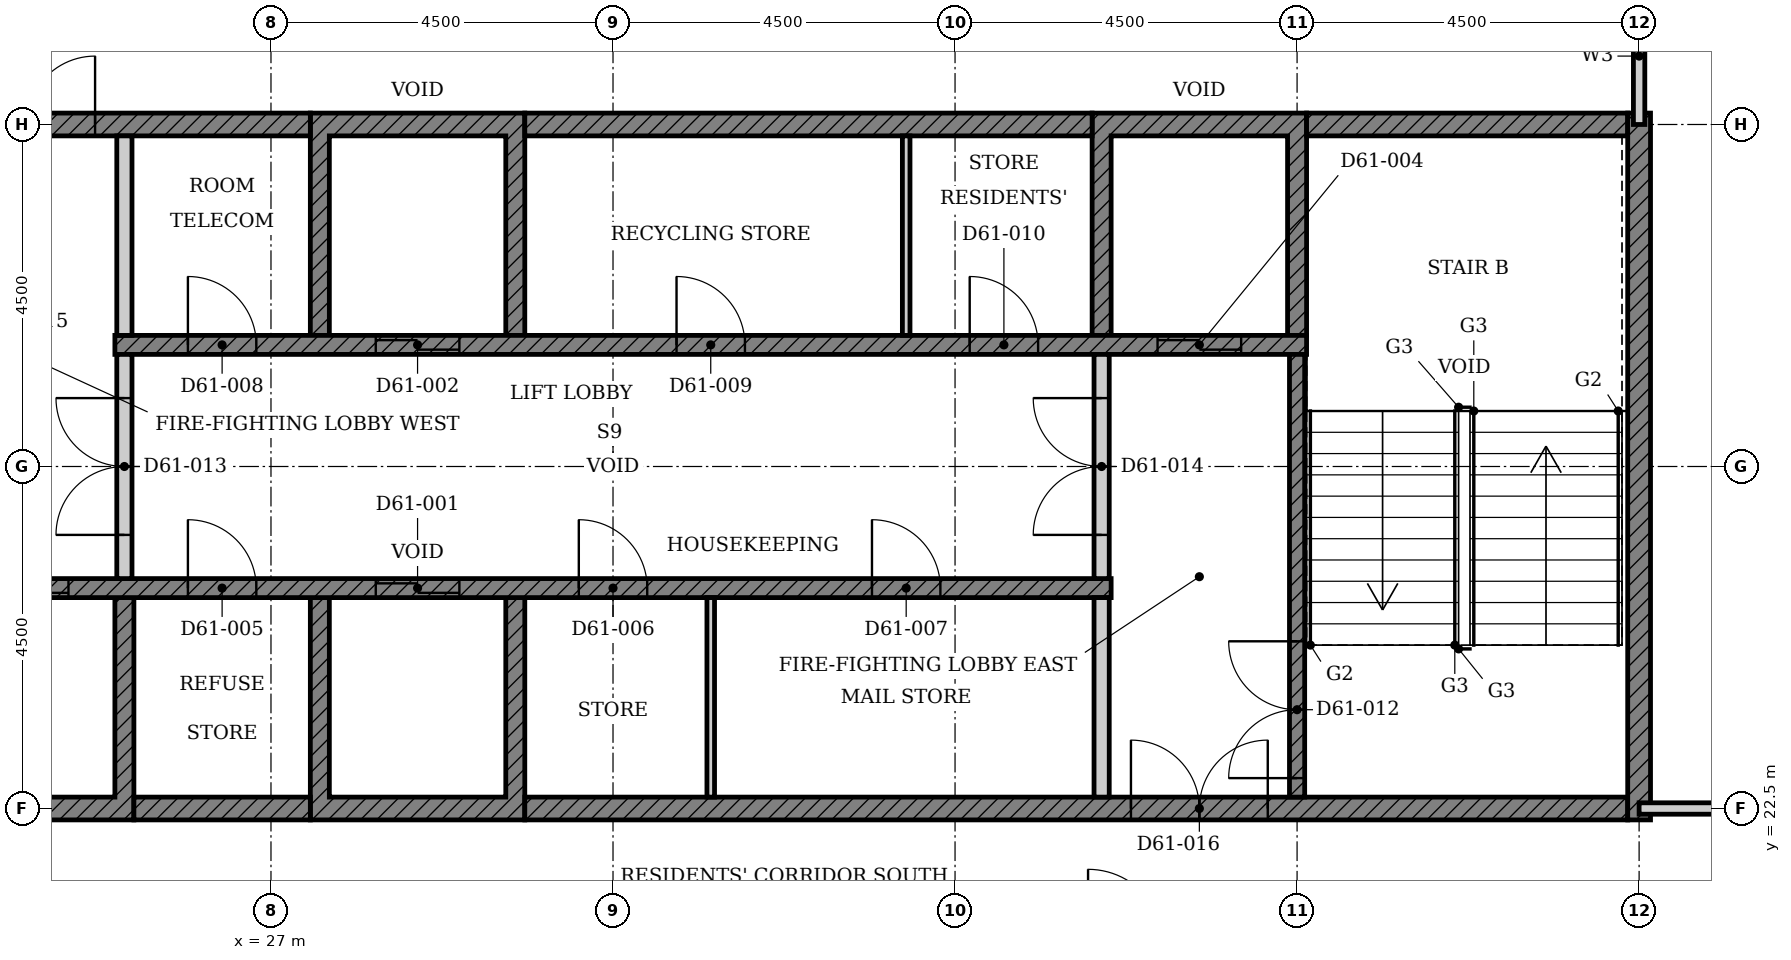
"""IFC4 building model, lengths in metres.
Left out: names, types, materials, properties, quantities, classifications, styles, units other than length and angle.
Written with IfcOpenShell. Run it as: python <this file> out.ifc"""

import sys

from ifc_helpers import new_model, si_unit, direction, frame, frame_2d, origin, place, context, subcontext, project, spatial, polyline, rectangle, outline, extrude, element, fill, save


model = new_model("IFC4")
c1 = context("Model", 3, precision=1e-05, world=origin(), true_north=direction((0.0, 1.0)))
c2 = subcontext(c1, "Body", "Model", "MODEL_VIEW")
j1 = project(units=[si_unit("LENGTHUNIT", "METRE"), si_unit("PLANEANGLEUNIT", "RADIAN")], contexts=[c1])
p1 = place(None, origin())
s1 = spatial("IfcSite", under=j1, at=p1, CompositionType="ELEMENT")
p2 = place(p1, origin())
s2 = spatial("IfcBuilding", under=s1, at=p2, CompositionType="ELEMENT")
p3 = place(p2, frame((0.0, 0.0, 241.6)))
s3 = spatial("IfcBuildingStorey", under=s2, at=p3, CompositionType="ELEMENT", Elevation=241.6)
p4 = place(p3, origin())
e1 = element("IfcWall", 1, at=p4, inside=s3, PredefinedType="SHEAR", context=c2, shape_type="SweptSolid", body=[
    extrude(outline(polyline([(22.375, 22.35), (25.197, 22.35), (25.197, 25.275), (24.947, 25.275), (24.947, 22.65), (22.625, 22.65), (22.625, 25.275), (22.375, 25.275), (22.375, 22.35)])), origin(), (0.0, 0.0, 1.0), 3.4),
])
p5 = place(p3, origin())
e2 = element("IfcWall", 2, at=p5, inside=s3, PredefinedType="SHEAR", context=c2, shape_type="SweptSolid", body=[
    extrude(outline(polyline([(27.518, 22.35), (30.339, 22.35), (30.339, 25.275), (30.089, 25.275), (30.089, 22.65), (27.768, 22.65), (27.768, 25.275), (27.518, 25.275), (27.518, 22.35)])), origin(), (0.0, 0.0, 1.0), 3.4),
])
p6 = place(p3, origin())
e3 = element("IfcWall", 3, at=p6, inside=s3, PredefinedType="SHEAR", context=c2, shape_type="SweptSolid", body=[
    extrude(outline(polyline([(27.518, 28.725), (27.768, 28.725), (27.768, 31.35), (30.089, 31.35), (30.089, 28.725), (30.339, 28.725), (30.339, 31.65), (27.518, 31.65), (27.518, 28.725)])), origin(), (0.0, 0.0, 1.0), 3.4),
])
p7 = place(p3, origin())
e4 = element("IfcWall", 4, at=p7, inside=s3, PredefinedType="SHEAR", context=c2, shape_type="SweptSolid", body=[
    extrude(outline(polyline([(37.803, 28.725), (38.053, 28.725), (38.053, 31.35), (40.375, 31.35), (40.375, 28.725), (40.625, 28.725), (40.625, 31.65), (37.803, 31.65), (37.803, 28.725)])), origin(), (0.0, 0.0, 1.0), 3.4),
])
p8 = place(p3, frame((25.197, 22.5, 0.0), z_axis=(0.0, 0.0, 1.0), x_axis=(1.0, 0.0, 0.0)))
e5 = element("IfcWall", 5, at=p8, inside=s3, PredefinedType="SHEAR", context=c2, shape_type="SweptSolid", body=[
    extrude(rectangle(XDim=2.321, YDim=0.3, at=frame_2d((1.161, 0.0))), origin(), (0.0, 0.0, 1.0), 3.4),
])
p9 = place(p3, frame((30.339, 22.5, 0.0), z_axis=(0.0, 0.0, 1.0), x_axis=(1.0, 0.0, 0.0)))
e6 = element("IfcWall", 6, at=p9, inside=s3, PredefinedType="SHEAR", context=c2, shape_type="SweptSolid", body=[
    extrude(rectangle(XDim=14.511, YDim=0.3, at=frame_2d((7.255, 0.0))), origin(), (0.0, 0.0, 1.0), 3.4),
])
p10 = place(p9, frame((7.975, 0.0, 0.0)))
e7 = element("IfcOpeningElement", 7, at=p10, cuts=e6, PredefinedType="OPENING", context=c2, shape_type="SweptSolid", body=[
    extrude(rectangle(XDim=1.8, YDim=2.1, at=frame_2d((0.9, 1.05))), frame((0.0, 0.16, 0.0), z_axis=(0.0, -1.0, 0.0), x_axis=(1.0, 0.0, 0.0)), (0.0, 0.0, 1.0), 0.32),
])
p11 = place(p3, frame((18.15, 31.5, 0.0), z_axis=(0.0, 0.0, 1.0), x_axis=(1.0, 0.0, 0.0)))
e8 = element("IfcWall", 8, at=p11, inside=s3, PredefinedType="SHEAR", context=c2, shape_type="SweptSolid", body=[
    extrude(rectangle(XDim=9.368, YDim=0.3, at=frame_2d((4.684, 0.0))), origin(), (0.0, 0.0, 1.0), 3.4),
])
p12 = place(p11, frame((4.736, 0.0, 0.0)))
e9 = element("IfcOpeningElement", 9, at=p12, cuts=e8, PredefinedType="OPENING", context=c2, shape_type="SweptSolid", body=[
    extrude(rectangle(XDim=1.8, YDim=2.1, at=frame_2d((0.9, 1.05))), frame((0.0, 0.16, 0.0), z_axis=(0.0, -1.0, 0.0), x_axis=(1.0, 0.0, 0.0)), (0.0, 0.0, 1.0), 0.32),
])
p13 = place(p3, frame((30.339, 31.5, 0.0), z_axis=(0.0, 0.0, 1.0), x_axis=(1.0, 0.0, 0.0)))
e10 = element("IfcWall", 10, at=p13, inside=s3, PredefinedType="SHEAR", context=c2, shape_type="SweptSolid", body=[
    extrude(rectangle(XDim=7.464, YDim=0.3, at=frame_2d((3.732, 0.0))), origin(), (0.0, 0.0, 1.0), 3.4),
])
p14 = place(p3, frame((40.625, 31.5, 0.0), z_axis=(0.0, 0.0, 1.0), x_axis=(1.0, 0.0, 0.0)))
e11 = element("IfcWall", 11, at=p14, inside=s3, PredefinedType="SHEAR", context=c2, shape_type="SweptSolid", body=[
    extrude(rectangle(XDim=4.225, YDim=0.3, at=frame_2d((2.113, 0.0))), origin(), (0.0, 0.0, 1.0), 3.4),
])
p15 = place(p3, frame((45.0, 22.35, 0.0), z_axis=(0.0, 0.0, 1.0), x_axis=(0.0, 1.0, 0.0)))
e12 = element("IfcWall", 12, at=p15, inside=s3, PredefinedType="SHEAR", context=c2, shape_type="SweptSolid", body=[
    extrude(rectangle(XDim=9.3, YDim=0.3, at=frame_2d((4.65, 0.0))), origin(), (0.0, 0.0, 1.0), 3.4),
])
p16 = place(p3, frame((22.375, 25.4, 0.0), z_axis=(0.0, 0.0, 1.0), x_axis=(1.0, 0.0, 0.0)))
e13 = element("IfcWall", 13, at=p16, inside=s3, PredefinedType="SHEAR", context=c2, shape_type="SweptSolid", body=[
    extrude(rectangle(XDim=15.678, YDim=0.25, at=frame_2d((7.839, 0.0))), origin(), (0.0, 0.0, 1.0), 3.4),
])
p17 = place(p16, frame((6.004, 0.0, 0.0)))
e14 = element("IfcOpeningElement", 14, at=p17, cuts=e13, PredefinedType="OPENING", context=c2, shape_type="SweptSolid", body=[
    extrude(rectangle(XDim=1.1, YDim=2.1, at=frame_2d((0.55, 1.05))), frame((0.0, 0.135, 0.0), z_axis=(0.0, -1.0, 0.0), x_axis=(1.0, 0.0, 0.0)), (0.0, 0.0, 1.0), 0.27),
])
p18 = place(p16, frame((0.861, 0.0, 0.0)))
e15 = element("IfcOpeningElement", 15, at=p18, cuts=e13, PredefinedType="OPENING", context=c2, shape_type="SweptSolid", body=[
    extrude(rectangle(XDim=1.1, YDim=2.1, at=frame_2d((0.55, 1.05))), frame((0.0, 0.135, 0.0), z_axis=(0.0, -1.0, 0.0), x_axis=(1.0, 0.0, 0.0)), (0.0, 0.0, 1.0), 0.27),
])
p19 = place(p16, frame((3.532, 0.0, 0.0)))
e16 = element("IfcOpeningElement", 16, at=p19, cuts=e13, PredefinedType="OPENING", context=c2, shape_type="SweptSolid", body=[
    extrude(rectangle(XDim=0.9, YDim=2.1, at=frame_2d((0.45, 1.05))), frame((0.0, 0.135, 0.0), z_axis=(0.0, -1.0, 0.0), x_axis=(1.0, 0.0, 0.0)), (0.0, 0.0, 1.0), 0.27),
])
p20 = place(p16, frame((8.675, 0.0, 0.0)))
e17 = element("IfcOpeningElement", 17, at=p20, cuts=e13, PredefinedType="OPENING", context=c2, shape_type="SweptSolid", body=[
    extrude(rectangle(XDim=0.9, YDim=2.1, at=frame_2d((0.45, 1.05))), frame((0.0, 0.135, 0.0), z_axis=(0.0, -1.0, 0.0), x_axis=(1.0, 0.0, 0.0)), (0.0, 0.0, 1.0), 0.27),
])
p21 = place(p16, frame((12.532, 0.0, 0.0)))
e18 = element("IfcOpeningElement", 18, at=p21, cuts=e13, PredefinedType="OPENING", context=c2, shape_type="SweptSolid", body=[
    extrude(rectangle(XDim=0.9, YDim=2.1, at=frame_2d((0.45, 1.05))), frame((0.0, 0.135, 0.0), z_axis=(0.0, -1.0, 0.0), x_axis=(1.0, 0.0, 0.0)), (0.0, 0.0, 1.0), 0.27),
])
p22 = place(p3, frame((24.947, 28.6, 0.0), z_axis=(0.0, 0.0, 1.0), x_axis=(1.0, 0.0, 0.0)))
e19 = element("IfcWall", 19, at=p22, inside=s3, PredefinedType="SHEAR", context=c2, shape_type="SweptSolid", body=[
    extrude(rectangle(XDim=15.678, YDim=0.25, at=frame_2d((7.839, 0.0))), origin(), (0.0, 0.0, 1.0), 3.4),
])
p23 = place(p22, frame((3.432, 0.0, 0.0)))
e20 = element("IfcOpeningElement", 20, at=p23, cuts=e19, PredefinedType="OPENING", context=c2, shape_type="SweptSolid", body=[
    extrude(rectangle(XDim=1.1, YDim=2.1, at=frame_2d((0.55, 1.05))), frame((0.0, 0.135, 0.0), z_axis=(0.0, -1.0, 0.0), x_axis=(1.0, 0.0, 0.0)), (0.0, 0.0, 1.0), 0.27),
])
p24 = place(p22, frame((13.718, 0.0, 0.0)))
e21 = element("IfcOpeningElement", 21, at=p24, cuts=e19, PredefinedType="OPENING", context=c2, shape_type="SweptSolid", body=[
    extrude(rectangle(XDim=1.1, YDim=2.1, at=frame_2d((0.55, 1.05))), frame((0.0, 0.135, 0.0), z_axis=(0.0, -1.0, 0.0), x_axis=(1.0, 0.0, 0.0)), (0.0, 0.0, 1.0), 0.27),
])
p25 = place(p22, frame((0.961, 0.0, 0.0)))
e22 = element("IfcOpeningElement", 22, at=p25, cuts=e19, PredefinedType="OPENING", context=c2, shape_type="SweptSolid", body=[
    extrude(rectangle(XDim=0.9, YDim=2.1, at=frame_2d((0.45, 1.05))), frame((0.0, 0.135, 0.0), z_axis=(0.0, -1.0, 0.0), x_axis=(1.0, 0.0, 0.0)), (0.0, 0.0, 1.0), 0.27),
])
p26 = place(p22, frame((7.389, 0.0, 0.0)))
e23 = element("IfcOpeningElement", 23, at=p26, cuts=e19, PredefinedType="OPENING", context=c2, shape_type="SweptSolid", body=[
    extrude(rectangle(XDim=0.9, YDim=2.1, at=frame_2d((0.45, 1.05))), frame((0.0, 0.135, 0.0), z_axis=(0.0, -1.0, 0.0), x_axis=(1.0, 0.0, 0.0)), (0.0, 0.0, 1.0), 0.27),
])
p27 = place(p22, frame((11.246, 0.0, 0.0)))
e24 = element("IfcOpeningElement", 24, at=p27, cuts=e19, PredefinedType="OPENING", context=c2, shape_type="SweptSolid", body=[
    extrude(rectangle(XDim=0.9, YDim=2.1, at=frame_2d((0.45, 1.05))), frame((0.0, 0.135, 0.0), z_axis=(0.0, -1.0, 0.0), x_axis=(1.0, 0.0, 0.0)), (0.0, 0.0, 1.0), 0.27),
])
p28 = place(p3, frame((37.928, 22.65, 0.0), z_axis=(0.0, 0.0, 1.0), x_axis=(0.0, 1.0, 0.0)))
e25 = element("IfcWall", 25, at=p28, inside=s3, PredefinedType="PARTITIONING", context=c2, shape_type="SweptSolid", body=[
    extrude(rectangle(XDim=2.625, YDim=0.2, at=frame_2d((1.312, 0.0))), origin(), (0.0, 0.0, 1.0), 3.4),
])
p29 = place(p3, frame((32.786, 22.65, 0.0), z_axis=(0.0, 0.0, 1.0), x_axis=(0.0, 1.0, 0.0)))
e26 = element("IfcWall", 26, at=p29, inside=s3, PredefinedType="PARTITIONING", context=c2, shape_type="SweptSolid", body=[
    extrude(rectangle(XDim=2.625, YDim=0.1, at=frame_2d((1.312, 0.0))), origin(), (0.0, 0.0, 1.0), 3.4),
])
p30 = place(p3, frame((25.072, 28.725, 0.0), z_axis=(0.0, 0.0, 1.0), x_axis=(0.0, 1.0, 0.0)))
e27 = element("IfcWall", 27, at=p30, inside=s3, PredefinedType="PARTITIONING", context=c2, shape_type="SweptSolid", body=[
    extrude(rectangle(XDim=2.625, YDim=0.2, at=frame_2d((1.312, 0.0))), origin(), (0.0, 0.0, 1.0), 3.4),
])
p31 = place(p3, frame((35.357, 28.725, 0.0), z_axis=(0.0, 0.0, 1.0), x_axis=(0.0, 1.0, 0.0)))
e28 = element("IfcWall", 28, at=p31, inside=s3, PredefinedType="PARTITIONING", context=c2, shape_type="SweptSolid", body=[
    extrude(rectangle(XDim=2.625, YDim=0.1, at=frame_2d((1.312, 0.0))), origin(), (0.0, 0.0, 1.0), 3.4),
])
p32 = place(p3, frame((40.5, 22.65, 0.0), z_axis=(0.0, 0.0, 1.0), x_axis=(0.0, 1.0, 0.0)))
e29 = element("IfcWall", 29, at=p32, inside=s3, PredefinedType="SHEAR", context=c2, shape_type="SweptSolid", body=[
    extrude(rectangle(XDim=5.825, YDim=0.2, at=frame_2d((2.913, 0.0))), origin(), (0.0, 0.0, 1.0), 3.4),
])
p33 = place(p32, frame((0.25, 0.0, 0.0)))
e30 = element("IfcOpeningElement", 30, at=p33, cuts=e29, PredefinedType="OPENING", context=c2, shape_type="SweptSolid", body=[
    extrude(rectangle(XDim=1.8, YDim=2.1, at=frame_2d((0.9, 1.05))), frame((0.0, 0.11, 0.0), z_axis=(0.0, -1.0, 0.0), x_axis=(1.0, 0.0, 0.0)), (0.0, 0.0, 1.0), 0.22),
])
p34 = place(p3, frame((25.072, 25.525, 0.0), z_axis=(0.0, 0.0, 1.0), x_axis=(0.0, 1.0, 0.0)))
e31 = element("IfcWall", 31, at=p34, inside=s3, PredefinedType="PARTITIONING", context=c2, shape_type="SweptSolid", body=[
    extrude(rectangle(XDim=2.95, YDim=0.2, at=frame_2d((1.475, 0.0))), origin(), (0.0, 0.0, 1.0), 3.4),
])
p35 = place(p34, frame((0.575, 0.0, 0.0)))
e32 = element("IfcOpeningElement", 32, at=p35, cuts=e31, PredefinedType="OPENING", context=c2, shape_type="SweptSolid", body=[
    extrude(rectangle(XDim=1.8, YDim=2.1, at=frame_2d((0.9, 1.05))), frame((0.0, 0.11, 0.0), z_axis=(0.0, -1.0, 0.0), x_axis=(1.0, 0.0, 0.0)), (0.0, 0.0, 1.0), 0.22),
])
p36 = place(p3, frame((37.928, 25.525, 0.0), z_axis=(0.0, 0.0, 1.0), x_axis=(0.0, 1.0, 0.0)))
e33 = element("IfcWall", 33, at=p36, inside=s3, PredefinedType="PARTITIONING", context=c2, shape_type="SweptSolid", body=[
    extrude(rectangle(XDim=2.95, YDim=0.2, at=frame_2d((1.475, 0.0))), origin(), (0.0, 0.0, 1.0), 3.4),
])
p37 = place(p36, frame((0.575, 0.0, 0.0)))
e34 = element("IfcOpeningElement", 34, at=p37, cuts=e33, PredefinedType="OPENING", context=c2, shape_type="SweptSolid", body=[
    extrude(rectangle(XDim=1.8, YDim=2.1, at=frame_2d((0.9, 1.05))), frame((0.0, 0.11, 0.0), z_axis=(0.0, -1.0, 0.0), x_axis=(1.0, 0.0, 0.0)), (0.0, 0.0, 1.0), 0.22),
])
p38 = place(p3, frame((45.0, 22.5, 0.0), z_axis=(0.0, 0.0, 1.0), x_axis=(1.0, 0.0, 0.0)))
e35 = element("IfcWall", 35, at=p38, inside=s3, PredefinedType="PARTITIONING", context=c2, shape_type="SweptSolid", body=[
    extrude(rectangle(XDim=4.74, YDim=0.15, at=frame_2d((2.37, 0.0))), origin(), (0.0, 0.0, 1.0), 3.4),
])
p39 = place(p38, frame((1.75, 0.0, 0.0)))
e36 = element("IfcOpeningElement", 36, at=p39, cuts=e35, PredefinedType="OPENING", context=c2, shape_type="SweptSolid", body=[
    extrude(rectangle(XDim=1.0, YDim=2.2, at=frame_2d((0.5, 1.1))), frame((0.0, 0.085, 0.0), z_axis=(0.0, -1.0, 0.0), x_axis=(1.0, 0.0, 0.0)), (0.0, 0.0, 1.0), 0.17),
])
p40 = place(p3, frame((45.0, 31.5, 0.0), z_axis=(0.0, 0.0, 1.0), x_axis=(0.0, 1.0, 0.0)))
e37 = element("IfcWall", 37, at=p40, inside=s3, PredefinedType="PARTITIONING", context=c2, shape_type="SweptSolid", body=[
    extrude(rectangle(XDim=1.8, YDim=0.15, at=frame_2d((0.9, 0.0))), origin(), (0.0, 0.0, 1.0), 3.4),
])
p41 = place(p17, origin())
e38 = element("IfcDoor", 38, at=p41, inside=s3, OperationType="DOUBLE_DOOR_SLIDING", PredefinedType="DOOR", context=c2, shape_type="SweptSolid", body=[
    extrude(rectangle(XDim=1.1, YDim=2.1, at=frame_2d((0.55, 1.05))), frame((0.0, 0.025, 0.0), z_axis=(0.0, -1.0, 0.0), x_axis=(1.0, 0.0, 0.0)), (0.0, 0.0, 1.0), 0.05),
])
fill(e14, e38)
p42 = place(p23, origin())
e39 = element("IfcDoor", 39, at=p42, inside=s3, OperationType="DOUBLE_DOOR_SLIDING", PredefinedType="DOOR", context=c2, shape_type="SweptSolid", body=[
    extrude(rectangle(XDim=1.1, YDim=2.1, at=frame_2d((0.55, 1.05))), frame((0.0, 0.025, 0.0), z_axis=(0.0, -1.0, 0.0), x_axis=(1.0, 0.0, 0.0)), (0.0, 0.0, 1.0), 0.05),
])
fill(e20, e39)
p43 = place(p18, origin())
e40 = element("IfcDoor", 40, at=p43, inside=s3, OperationType="DOUBLE_DOOR_SLIDING", PredefinedType="DOOR", context=c2, shape_type="SweptSolid", body=[
    extrude(rectangle(XDim=1.1, YDim=2.1, at=frame_2d((0.55, 1.05))), frame((0.0, 0.025, 0.0), z_axis=(0.0, -1.0, 0.0), x_axis=(1.0, 0.0, 0.0)), (0.0, 0.0, 1.0), 0.05),
])
fill(e15, e40)
p44 = place(p24, origin())
e41 = element("IfcDoor", 41, at=p44, inside=s3, OperationType="DOUBLE_DOOR_SLIDING", PredefinedType="DOOR", context=c2, shape_type="SweptSolid", body=[
    extrude(rectangle(XDim=1.1, YDim=2.1, at=frame_2d((0.55, 1.05))), frame((0.0, 0.025, 0.0), z_axis=(0.0, -1.0, 0.0), x_axis=(1.0, 0.0, 0.0)), (0.0, 0.0, 1.0), 0.05),
])
fill(e21, e41)
p45 = place(p19, origin())
e42 = element("IfcDoor", 42, at=p45, inside=s3, OperationType="SINGLE_SWING_LEFT", PredefinedType="DOOR", context=c2, shape_type="SweptSolid", body=[
    extrude(rectangle(XDim=0.9, YDim=2.1, at=frame_2d((0.45, 1.05))), frame((0.0, 0.025, 0.0), z_axis=(0.0, -1.0, 0.0), x_axis=(1.0, 0.0, 0.0)), (0.0, 0.0, 1.0), 0.05),
])
fill(e16, e42)
p46 = place(p20, origin())
e43 = element("IfcDoor", 43, at=p46, inside=s3, OperationType="SINGLE_SWING_LEFT", PredefinedType="DOOR", context=c2, shape_type="SweptSolid", body=[
    extrude(rectangle(XDim=0.9, YDim=2.1, at=frame_2d((0.45, 1.05))), frame((0.0, 0.025, 0.0), z_axis=(0.0, -1.0, 0.0), x_axis=(1.0, 0.0, 0.0)), (0.0, 0.0, 1.0), 0.05),
])
fill(e17, e43)
p47 = place(p21, origin())
e44 = element("IfcDoor", 44, at=p47, inside=s3, OperationType="SINGLE_SWING_LEFT", PredefinedType="DOOR", context=c2, shape_type="SweptSolid", body=[
    extrude(rectangle(XDim=0.9, YDim=2.1, at=frame_2d((0.45, 1.05))), frame((0.0, 0.025, 0.0), z_axis=(0.0, -1.0, 0.0), x_axis=(1.0, 0.0, 0.0)), (0.0, 0.0, 1.0), 0.05),
])
fill(e18, e44)
p48 = place(p25, origin())
e45 = element("IfcDoor", 45, at=p48, inside=s3, OperationType="SINGLE_SWING_LEFT", PredefinedType="DOOR", context=c2, shape_type="SweptSolid", body=[
    extrude(rectangle(XDim=0.9, YDim=2.1, at=frame_2d((0.45, 1.05))), frame((0.0, 0.025, 0.0), z_axis=(0.0, -1.0, 0.0), x_axis=(1.0, 0.0, 0.0)), (0.0, 0.0, 1.0), 0.05),
])
fill(e22, e45)
p49 = place(p26, origin())
e46 = element("IfcDoor", 46, at=p49, inside=s3, OperationType="SINGLE_SWING_LEFT", PredefinedType="DOOR", context=c2, shape_type="SweptSolid", body=[
    extrude(rectangle(XDim=0.9, YDim=2.1, at=frame_2d((0.45, 1.05))), frame((0.0, 0.025, 0.0), z_axis=(0.0, -1.0, 0.0), x_axis=(1.0, 0.0, 0.0)), (0.0, 0.0, 1.0), 0.05),
])
fill(e23, e46)
p50 = place(p27, origin())
e47 = element("IfcDoor", 47, at=p50, inside=s3, OperationType="SINGLE_SWING_LEFT", PredefinedType="DOOR", context=c2, shape_type="SweptSolid", body=[
    extrude(rectangle(XDim=0.9, YDim=2.1, at=frame_2d((0.45, 1.05))), frame((0.0, 0.025, 0.0), z_axis=(0.0, -1.0, 0.0), x_axis=(1.0, 0.0, 0.0)), (0.0, 0.0, 1.0), 0.05),
])
fill(e24, e47)
p51 = place(p33, origin())
e48 = element("IfcDoor", 48, at=p51, inside=s3, OperationType="DOUBLE_DOOR_SINGLE_SWING", PredefinedType="DOOR", context=c2, shape_type="SweptSolid", body=[
    extrude(rectangle(XDim=1.8, YDim=2.1, at=frame_2d((0.9, 1.05))), frame((0.0, 0.025, 0.0), z_axis=(0.0, -1.0, 0.0), x_axis=(1.0, 0.0, 0.0)), (0.0, 0.0, 1.0), 0.05),
])
fill(e30, e48)
p52 = place(p35, origin())
e49 = element("IfcDoor", 49, at=p52, inside=s3, OperationType="DOUBLE_DOOR_SINGLE_SWING", PredefinedType="DOOR", context=c2, shape_type="SweptSolid", body=[
    extrude(rectangle(XDim=1.8, YDim=2.1, at=frame_2d((0.9, 1.05))), frame((0.0, 0.025, 0.0), z_axis=(0.0, -1.0, 0.0), x_axis=(1.0, 0.0, 0.0)), (0.0, 0.0, 1.0), 0.05),
])
fill(e32, e49)
p53 = place(p37, origin())
e50 = element("IfcDoor", 50, at=p53, inside=s3, OperationType="DOUBLE_DOOR_SINGLE_SWING", PredefinedType="DOOR", context=c2, shape_type="SweptSolid", body=[
    extrude(rectangle(XDim=1.8, YDim=2.1, at=frame_2d((0.9, 1.05))), frame((0.0, 0.025, 0.0), z_axis=(0.0, -1.0, 0.0), x_axis=(1.0, 0.0, 0.0)), (0.0, 0.0, 1.0), 0.05),
])
fill(e34, e50)
p54 = place(p12, origin())
e51 = element("IfcDoor", 51, at=p54, inside=s3, OperationType="DOUBLE_DOOR_SINGLE_SWING", PredefinedType="DOOR", context=c2, shape_type="SweptSolid", body=[
    extrude(rectangle(XDim=1.8, YDim=2.1, at=frame_2d((0.9, 1.05))), frame((0.0, 0.025, 0.0), z_axis=(0.0, -1.0, 0.0), x_axis=(1.0, 0.0, 0.0)), (0.0, 0.0, 1.0), 0.05),
])
fill(e9, e51)
p55 = place(p10, origin())
e52 = element("IfcDoor", 52, at=p55, inside=s3, OperationType="DOUBLE_DOOR_SINGLE_SWING", PredefinedType="DOOR", context=c2, shape_type="SweptSolid", body=[
    extrude(rectangle(XDim=1.8, YDim=2.1, at=frame_2d((0.9, 1.05))), frame((0.0, 0.025, 0.0), z_axis=(0.0, -1.0, 0.0), x_axis=(1.0, 0.0, 0.0)), (0.0, 0.0, 1.0), 0.05),
])
fill(e7, e52)
save(model, sys.argv[1])
